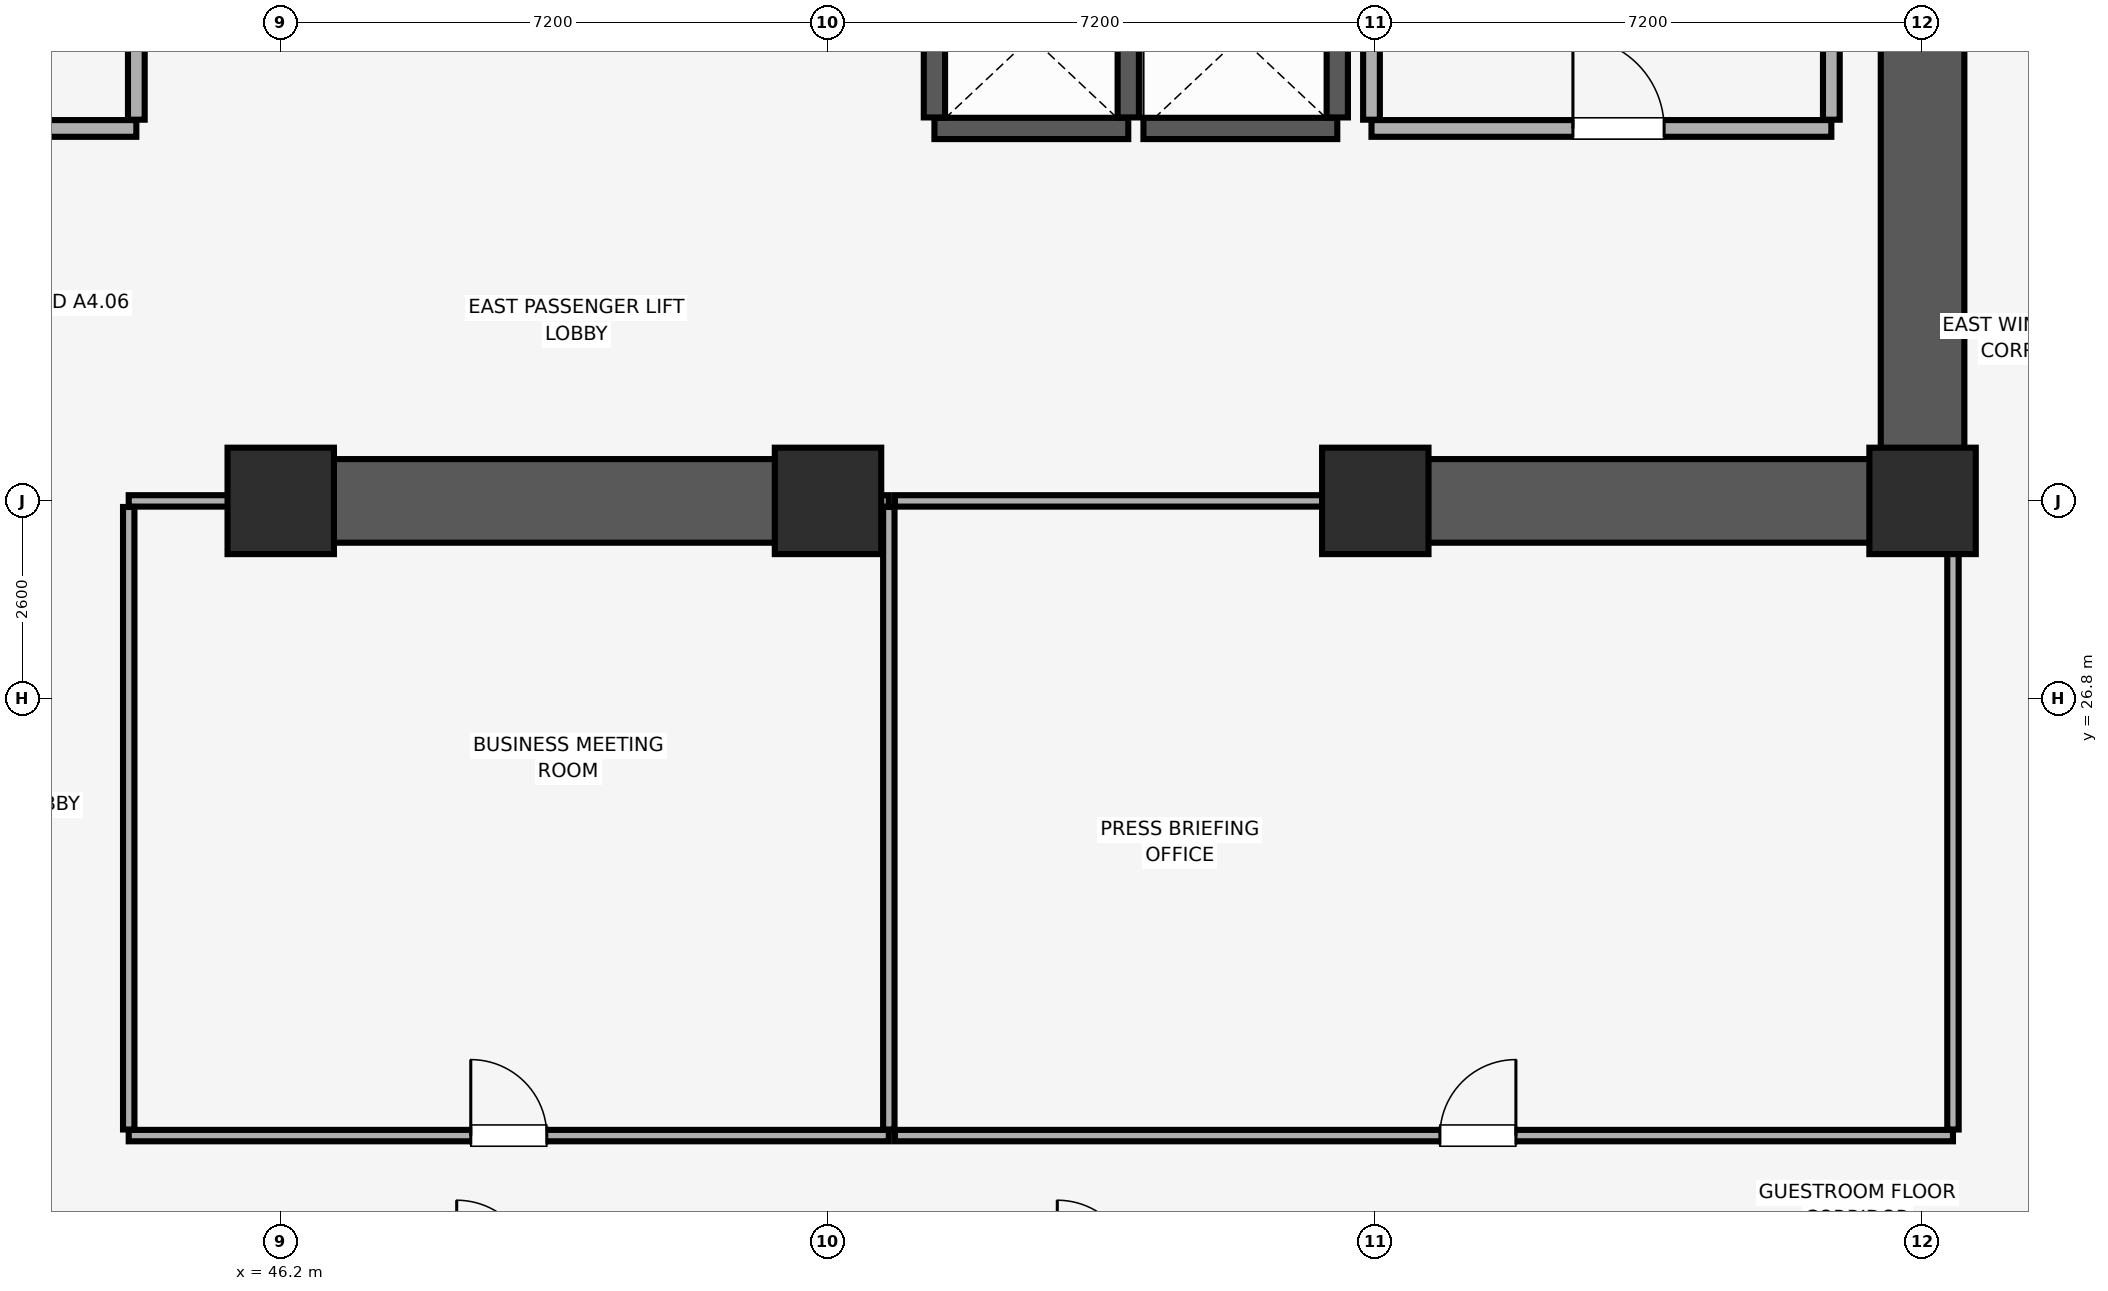
"""IFC4 building model, lengths in metres.
Left out: names, types, materials, properties, quantities, classifications, styles, units other than length and angle.
Written with IfcOpenShell. Run it as: python <this file> out.ifc"""

import sys

from ifc_helpers import new_model, si_unit, direction, frame, frame_2d, origin, origin_2d, place, context, subcontext, project, spatial, rectangle, extrude, element, fill, save


model = new_model("IFC4")
c1 = context("Model", 3, precision=1e-05, world=origin(), true_north=direction((0.0, 1.0)))
c2 = subcontext(c1, "Body", "Model", "MODEL_VIEW")
j1 = project(units=[si_unit("LENGTHUNIT", "METRE"), si_unit("PLANEANGLEUNIT", "RADIAN")], contexts=[c1])
p1 = place(None, origin())
s1 = spatial("IfcSite", under=j1, at=p1, CompositionType="ELEMENT")
p2 = place(p1, origin())
s2 = spatial("IfcBuilding", under=s1, at=p2, CompositionType="ELEMENT")
p3 = place(p2, frame((0.0, 0.0, 72.65)))
s3 = spatial("IfcBuildingStorey", under=s2, at=p3, CompositionType="ELEMENT", Elevation=72.65)
for number, where, z_axis, x_axis in (
    (1, (46.2, 29.4, 0.0), (0.0, 0.0, 1.0), (1.0, 0.0, 0.0)),
    (2, (53.4, 29.4, 0.0), (0.0, 0.0, 1.0), (1.0, 0.0, 0.0)),
    (3, (60.6, 29.4, 0.0), (0.0, 0.0, 1.0), (1.0, 0.0, 0.0)),
    (4, (67.8, 29.4, 0.0), (0.0, 0.0, 1.0), (1.0, 0.0, 0.0)),
):
    element("IfcColumn", number, at=place(p3, frame(where, z_axis=z_axis, x_axis=x_axis)), inside=s3, PredefinedType="COLUMN", context=c2, shape_type="SweptSolid", body=[
        extrude(rectangle(XDim=1.4, YDim=1.4, at=origin_2d()), origin(), (0.0, 0.0, 1.0), 3.51),
    ])
p4 = place(p3, frame((67.8, 29.4, 0.0), z_axis=(0.0, 0.0, 1.0), x_axis=(0.0, 1.0, 0.0)))
e5 = element("IfcWall", 5, at=p4, inside=s3, PredefinedType="SHEAR", context=c2, shape_type="SweptSolid", body=[
    extrude(rectangle(XDim=19.2, YDim=1.1, at=frame_2d((9.6, 0.0))), origin(), (0.0, 0.0, 1.0), 3.51),
])
p5 = place(p3, frame((46.0, 29.4, 0.0), z_axis=(0.0, 0.0, 1.0), x_axis=(1.0, 0.0, 0.0)))
e6 = element("IfcWall", 6, at=p5, inside=s3, PredefinedType="SHEAR", context=c2, shape_type="SweptSolid", body=[
    extrude(rectangle(XDim=7.6, YDim=1.1, at=frame_2d((3.8, 0.0))), origin(), (0.0, 0.0, 1.0), 3.51),
])
p6 = place(p3, frame((60.4, 29.4, 0.0), z_axis=(0.0, 0.0, 1.0), x_axis=(1.0, 0.0, 0.0)))
e7 = element("IfcWall", 7, at=p6, inside=s3, PredefinedType="SHEAR", context=c2, shape_type="SweptSolid", body=[
    extrude(rectangle(XDim=6.845, YDim=1.1, at=frame_2d((3.423, 0.0))), origin(), (0.0, 0.0, 1.0), 3.51),
])
p7 = place(p3, frame((54.8, 34.3, 0.0), z_axis=(0.0, 0.0, 1.0), x_axis=(1.0, 0.0, 0.0)))
e8 = element("IfcWall", 8, at=p7, inside=s3, PredefinedType="SHEAR", context=c2, shape_type="SweptSolid", body=[
    extrude(rectangle(XDim=2.55, YDim=0.28, at=frame_2d((1.275, 0.0))), origin(), (0.0, 0.0, 1.0), 3.51),
])
for number, where, z_axis, x_axis in (
    (9, (54.8, 34.445, 0.0), (0.0, 0.0, 1.0), (0.0, 1.0, 0.0)),
    (10, (57.35, 34.445, 0.0), (0.0, 0.0, 1.0), (0.0, 1.0, 0.0)),
):
    element("IfcWall", number, at=place(p3, frame(where, z_axis=z_axis, x_axis=x_axis)), inside=s3, PredefinedType="SHEAR", context=c2, shape_type="SweptSolid", body=[
        extrude(rectangle(XDim=2.11, YDim=0.28, at=frame_2d((1.055, 0.0))), origin(), (0.0, 0.0, 1.0), 3.51),
    ])
p8 = place(p3, frame((57.55, 34.3, 0.0), z_axis=(0.0, 0.0, 1.0), x_axis=(1.0, 0.0, 0.0)))
e11 = element("IfcWall", 11, at=p8, inside=s3, PredefinedType="SHEAR", context=c2, shape_type="SweptSolid", body=[
    extrude(rectangle(XDim=2.55, YDim=0.28, at=frame_2d((1.275, 0.0))), origin(), (0.0, 0.0, 1.0), 3.51),
])
p9 = place(p3, frame((60.1, 34.445, 0.0), z_axis=(0.0, 0.0, 1.0), x_axis=(0.0, 1.0, 0.0)))
e12 = element("IfcWall", 12, at=p9, inside=s3, PredefinedType="SHEAR", context=c2, shape_type="SweptSolid", body=[
    extrude(rectangle(XDim=2.11, YDim=0.28, at=frame_2d((1.055, 0.0))), origin(), (0.0, 0.0, 1.0), 3.51),
])
p10 = place(p3, frame((60.55, 34.3, 0.0), z_axis=(0.0, 0.0, 1.0), x_axis=(1.0, 0.0, 0.0)))
e13 = element("IfcWall", 13, at=p10, inside=s3, PredefinedType="PARTITIONING", context=c2, shape_type="SweptSolid", body=[
    extrude(rectangle(XDim=6.05, YDim=0.22, at=frame_2d((3.025, 0.0))), origin(), (0.0, 0.0, 1.0), 3.51),
])
p11 = place(p10, frame((2.65, 0.0, 0.0)))
e14 = element("IfcOpeningElement", 14, at=p11, cuts=e13, PredefinedType="OPENING", context=c2, shape_type="SweptSolid", body=[
    extrude(rectangle(XDim=1.2, YDim=2.15, at=frame_2d((0.6, 1.075))), frame((0.0, 0.12, 0.0), z_axis=(0.0, -1.0, 0.0), x_axis=(1.0, 0.0, 0.0)), (0.0, 0.0, 1.0), 0.24),
])
p12 = place(p3, frame((60.55, 34.415, 0.0), z_axis=(0.0, 0.0, 1.0), x_axis=(0.0, 1.0, 0.0)))
e15 = element("IfcWall", 15, at=p12, inside=s3, PredefinedType="PARTITIONING", context=c2, shape_type="SweptSolid", body=[
    extrude(rectangle(XDim=5.64, YDim=0.22, at=frame_2d((2.82, 0.0))), origin(), (0.0, 0.0, 1.0), 3.51),
])
p13 = place(p3, frame((66.6, 34.415, 0.0), z_axis=(0.0, 0.0, 1.0), x_axis=(0.0, 1.0, 0.0)))
e16 = element("IfcWall", 16, at=p13, inside=s3, PredefinedType="PARTITIONING", context=c2, shape_type="SweptSolid", body=[
    extrude(rectangle(XDim=5.43, YDim=0.22, at=frame_2d((2.715, 0.0))), origin(), (0.0, 0.0, 1.0), 3.51),
])
p14 = place(p3, frame((39.7, 34.3, 0.0), z_axis=(0.0, 0.0, 1.0), x_axis=(1.0, 0.0, 0.0)))
e17 = element("IfcWall", 17, at=p14, inside=s3, PredefinedType="PARTITIONING", context=c2, shape_type="SweptSolid", body=[
    extrude(rectangle(XDim=4.6, YDim=0.22, at=frame_2d((2.3, 0.0))), origin(), (0.0, 0.0, 1.0), 3.51),
])
p15 = place(p14, frame((1.7, 0.0, 0.0)))
e18 = element("IfcOpeningElement", 18, at=p15, cuts=e17, PredefinedType="OPENING", context=c2, shape_type="SweptSolid", body=[
    extrude(rectangle(XDim=1.2, YDim=2.15, at=frame_2d((0.6, 1.075))), frame((0.0, 0.12, 0.0), z_axis=(0.0, -1.0, 0.0), x_axis=(1.0, 0.0, 0.0)), (0.0, 0.0, 1.0), 0.24),
])
p16 = place(p3, frame((44.3, 34.415, 0.0), z_axis=(0.0, 0.0, 1.0), x_axis=(0.0, 1.0, 0.0)))
e19 = element("IfcWall", 19, at=p16, inside=s3, PredefinedType="PARTITIONING", context=c2, shape_type="SweptSolid", body=[
    extrude(rectangle(XDim=5.785, YDim=0.22, at=frame_2d((2.893, 0.0))), origin(), (0.0, 0.0, 1.0), 3.51),
])
p17 = place(p3, frame((44.2, 21.05, 0.0), z_axis=(0.0, 0.0, 1.0), x_axis=(1.0, 0.0, 0.0)))
e20 = element("IfcWall", 20, at=p17, inside=s3, PredefinedType="PARTITIONING", context=c2, shape_type="SweptSolid", body=[
    extrude(rectangle(XDim=10.0, YDim=0.15, at=frame_2d((5.0, 0.0))), origin(), (0.0, 0.0, 1.0), 3.51),
])
p18 = place(p17, frame((4.5, 0.0, 0.0)))
e21 = element("IfcOpeningElement", 21, at=p18, cuts=e20, PredefinedType="OPENING", context=c2, shape_type="SweptSolid", body=[
    extrude(rectangle(XDim=1.0, YDim=2.15, at=frame_2d((0.5, 1.075))), frame((0.0, 0.085, 0.0), z_axis=(0.0, -1.0, 0.0), x_axis=(1.0, 0.0, 0.0)), (0.0, 0.0, 1.0), 0.17),
])
p19 = place(p3, frame((44.2, 29.4, 0.0), z_axis=(0.0, 0.0, 1.0), x_axis=(1.0, 0.0, 0.0)))
e22 = element("IfcWall", 22, at=p19, inside=s3, PredefinedType="PARTITIONING", context=c2, shape_type="SweptSolid", body=[
    extrude(rectangle(XDim=1.79, YDim=0.15, at=frame_2d((0.895, 0.0))), origin(), (0.0, 0.0, 1.0), 2.41),
])
p20 = place(p3, frame((53.61, 29.4, 0.0), z_axis=(0.0, 0.0, 1.0), x_axis=(1.0, 0.0, 0.0)))
e23 = element("IfcWall", 23, at=p20, inside=s3, PredefinedType="PARTITIONING", context=c2, shape_type="SweptSolid", body=[
    extrude(rectangle(XDim=0.59, YDim=0.15, at=frame_2d((0.295, 0.0))), origin(), (0.0, 0.0, 1.0), 2.41),
])
for number, where, z_axis, x_axis in (
    (24, (44.2, 21.13, 0.0), (0.0, 0.0, 1.0), (0.0, 1.0, 0.0)),
    (25, (54.2, 21.13, 0.0), (0.0, 0.0, 1.0), (0.0, 1.0, 0.0)),
):
    element("IfcWall", number, at=place(p3, frame(where, z_axis=z_axis, x_axis=x_axis)), inside=s3, PredefinedType="PARTITIONING", context=c2, shape_type="SweptSolid", body=[
        extrude(rectangle(XDim=8.19, YDim=0.15, at=frame_2d((4.095, 0.0))), origin(), (0.0, 0.0, 1.0), 3.51),
    ])
p21 = place(p3, frame((54.28, 21.05, 0.0), z_axis=(0.0, 0.0, 1.0), x_axis=(1.0, 0.0, 0.0)))
e26 = element("IfcWall", 26, at=p21, inside=s3, PredefinedType="PARTITIONING", context=c2, shape_type="SweptSolid", body=[
    extrude(rectangle(XDim=13.92, YDim=0.15, at=frame_2d((6.96, 0.0))), origin(), (0.0, 0.0, 1.0), 3.51),
])
p22 = place(p21, frame((7.17, 0.0, 0.0)))
e27 = element("IfcOpeningElement", 27, at=p22, cuts=e26, PredefinedType="OPENING", context=c2, shape_type="SweptSolid", body=[
    extrude(rectangle(XDim=1.0, YDim=2.15, at=frame_2d((0.5, 1.075))), frame((0.0, 0.085, 0.0), z_axis=(0.0, -1.0, 0.0), x_axis=(1.0, 0.0, 0.0)), (0.0, 0.0, 1.0), 0.17),
])
p23 = place(p3, frame((54.28, 29.4, 0.0), z_axis=(0.0, 0.0, 1.0), x_axis=(1.0, 0.0, 0.0)))
e28 = element("IfcWall", 28, at=p23, inside=s3, PredefinedType="PARTITIONING", context=c2, shape_type="SweptSolid", body=[
    extrude(rectangle(XDim=6.11, YDim=0.15, at=frame_2d((3.055, 0.0))), origin(), (0.0, 0.0, 1.0), 2.41),
])
p24 = place(p3, frame((68.2, 21.13, 0.0), z_axis=(0.0, 0.0, 1.0), x_axis=(0.0, 1.0, 0.0)))
e29 = element("IfcWall", 29, at=p24, inside=s3, PredefinedType="PARTITIONING", context=c2, shape_type="SweptSolid", body=[
    extrude(rectangle(XDim=8.26, YDim=0.15, at=frame_2d((4.13, 0.0))), origin(), (0.0, 0.0, 1.0), 3.51),
])
p25 = place(p11, origin())
e30 = element("IfcDoor", 30, at=p25, inside=s3, OperationType="SINGLE_SWING_LEFT", PredefinedType="DOOR", context=c2, shape_type="SweptSolid", body=[
    extrude(rectangle(XDim=1.2, YDim=2.15, at=frame_2d((0.6, 1.075))), frame((0.0, 0.025, 0.0), z_axis=(0.0, -1.0, 0.0), x_axis=(1.0, 0.0, 0.0)), (0.0, 0.0, 1.0), 0.05),
])
fill(e14, e30)
p26 = place(p18, origin())
e31 = element("IfcDoor", 31, at=p26, inside=s3, OperationType="SINGLE_SWING_LEFT", PredefinedType="DOOR", context=c2, shape_type="SweptSolid", body=[
    extrude(rectangle(XDim=1.0, YDim=2.15, at=frame_2d((0.5, 1.075))), frame((0.0, 0.025, 0.0), z_axis=(0.0, -1.0, 0.0), x_axis=(1.0, 0.0, 0.0)), (0.0, 0.0, 1.0), 0.05),
])
fill(e21, e31)
p27 = place(p22, origin())
e32 = element("IfcDoor", 32, at=p27, inside=s3, OperationType="SINGLE_SWING_RIGHT", PredefinedType="DOOR", context=c2, shape_type="SweptSolid", body=[
    extrude(rectangle(XDim=1.0, YDim=2.15, at=frame_2d((0.5, 1.075))), frame((0.0, 0.025, 0.0), z_axis=(0.0, -1.0, 0.0), x_axis=(1.0, 0.0, 0.0)), (0.0, 0.0, 1.0), 0.05),
])
fill(e27, e32)
save(model, sys.argv[1])
